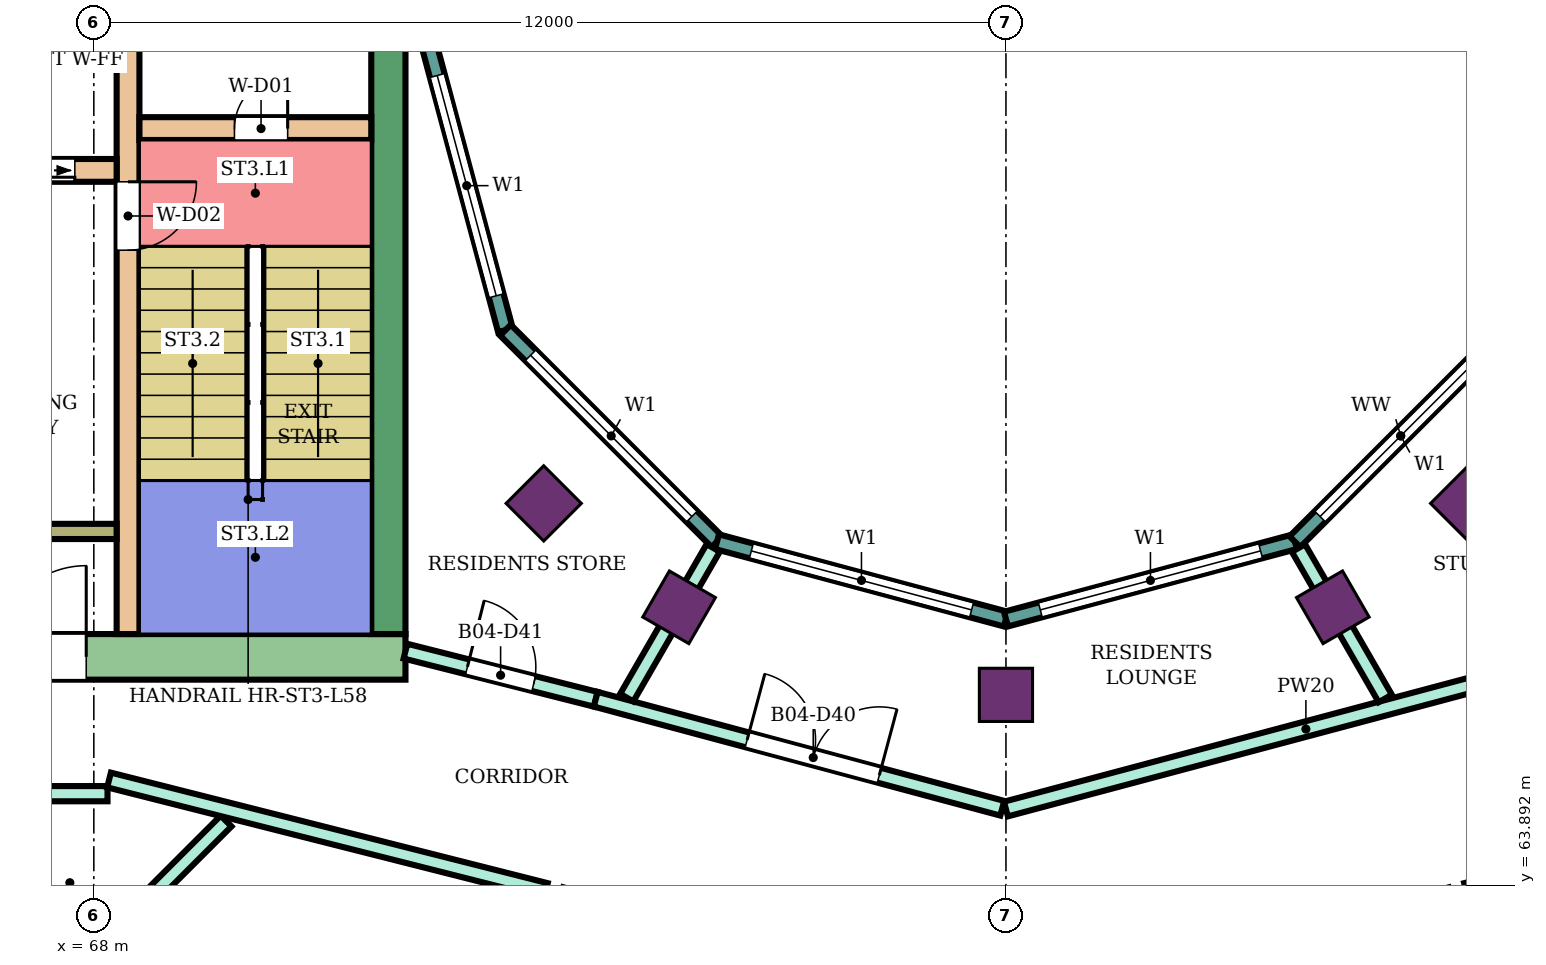
"""IFC4 building model, lengths in metres.
Left out: names, types, materials, properties, quantities, classifications, styles, units other than length and angle.
Written with IfcOpenShell. Run it as: python <this file> out.ifc"""

import sys

from ifc_helpers import new_model, si_unit, direction, frame, frame_2d, origin, origin_2d, place, context, subcontext, project, spatial, rectangle, extrude, element, fill, save


model = new_model("IFC4")
c1 = context("Model", 3, precision=1e-05, world=origin(), true_north=direction((0.0, 1.0)))
c2 = subcontext(c1, "Body", "Model", "MODEL_VIEW")
j1 = project(units=[si_unit("LENGTHUNIT", "METRE"), si_unit("PLANEANGLEUNIT", "RADIAN")], contexts=[c1])
p1 = place(None, origin())
s1 = spatial("IfcSite", under=j1, at=p1, CompositionType="ELEMENT")
p2 = place(p1, origin())
s2 = spatial("IfcBuilding", under=s1, at=p2, CompositionType="ELEMENT")
p3 = place(p2, frame((0.0, 0.0, 254.1)))
s3 = spatial("IfcBuildingStorey", under=s2, at=p3, CompositionType="ELEMENT", Elevation=254.1)
for number, where, z_axis, x_axis in (
    (1, (73.919, 68.919, 0.0), (0.0, 0.0, 1.0), (-0.707, -0.707, 0.0)),
    (2, (75.7, 67.552, 0.0), (0.0, 0.0, 1.0), (-0.5, -0.866, 0.0)),
    (3, (80.0, 66.4, 0.0), (0.0, 0.0, 1.0), (0.0, -1.0, 0.0)),
    (4, (84.3, 67.552, 0.0), (0.0, 0.0, 1.0), (0.5, -0.866, 0.0)),
    (5, (86.081, 68.919, 0.0), (0.0, 0.0, 1.0), (0.707, -0.707, 0.0)),
):
    element("IfcColumn", number, at=place(p3, frame(where, z_axis=z_axis, x_axis=x_axis)), inside=s3, PredefinedType="COLUMN", context=c2, shape_type="SweptSolid", body=[
        extrude(rectangle(XDim=0.7, YDim=0.7, at=origin_2d()), origin(), (0.0, 0.0, 1.0), 4.2),
    ])
p4 = place(p3, frame((72.1, 66.9, 0.0), z_axis=(0.0, 0.0, 1.0), x_axis=(-1.0, 0.0, 0.0)))
e6 = element("IfcWall", 6, at=p4, inside=s3, PredefinedType="SHEAR", context=c2, shape_type="SweptSolid", body=[
    extrude(rectangle(XDim=14.9, YDim=0.6, at=frame_2d((7.45, 0.0))), origin(), (0.0, 0.0, 1.0), 3.88),
])
p5 = place(p4, frame((4.2, 0.0, 0.0)))
e7 = element("IfcOpeningElement", 7, at=p5, cuts=e6, PredefinedType="OPENING", context=c2, shape_type="SweptSolid", body=[
    extrude(rectangle(XDim=2.4, YDim=2.4, at=frame_2d((1.2, 1.2))), frame((0.0, 0.31, 0.0), z_axis=(0.0, -1.0, 0.0), x_axis=(1.0, 0.0, 0.0)), (0.0, 0.0, 1.0), 0.62),
])
p6 = place(p3, frame((71.875, 75.0, 0.0), z_axis=(0.0, 0.0, 1.0), x_axis=(0.0, -1.0, 0.0)))
e8 = element("IfcWall", 8, at=p6, inside=s3, PredefinedType="SHEAR", context=c2, shape_type="SweptSolid", body=[
    extrude(rectangle(XDim=7.8, YDim=0.45, at=frame_2d((3.9, 0.0))), origin(), (0.0, 0.0, 1.0), 3.88),
])
p7 = place(p3, frame((68.45, 75.0, 0.0), z_axis=(0.0, 0.0, 1.0), x_axis=(0.0, -1.0, 0.0)))
e9 = element("IfcWall", 9, at=p7, inside=s3, PredefinedType="SHEAR", context=c2, shape_type="SweptSolid", body=[
    extrude(rectangle(XDim=7.8, YDim=0.3, at=frame_2d((3.9, 0.0))), origin(), (0.0, 0.0, 1.0), 3.88),
])
p8 = place(p7, frame((1.85, 0.0, 0.0)))
e10 = element("IfcOpeningElement", 10, at=p8, cuts=e9, PredefinedType="OPENING", context=c2, shape_type="SweptSolid", body=[
    extrude(rectangle(XDim=0.9, YDim=2.1, at=frame_2d((0.45, 1.05))), frame((0.0, 0.16, 0.0), z_axis=(0.0, -1.0, 0.0), x_axis=(1.0, 0.0, 0.0)), (0.0, 0.0, 1.0), 0.32),
])
p9 = place(p3, frame((71.65, 73.85, 0.0), z_axis=(0.0, 0.0, 1.0), x_axis=(-1.0, 0.0, 0.0)))
e11 = element("IfcWall", 11, at=p9, inside=s3, PredefinedType="SHEAR", context=c2, shape_type="SweptSolid", body=[
    extrude(rectangle(XDim=3.05, YDim=0.3, at=frame_2d((1.525, 0.0))), origin(), (0.0, 0.0, 1.0), 3.88),
])
p10 = place(p9, frame((1.1, 0.0, 0.0)))
e12 = element("IfcOpeningElement", 12, at=p10, cuts=e11, PredefinedType="OPENING", context=c2, shape_type="SweptSolid", body=[
    extrude(rectangle(XDim=0.7, YDim=2.0, at=frame_2d((0.35, 1.0))), frame((0.0, 0.16, 0.0), z_axis=(0.0, -1.0, 0.0), x_axis=(1.0, 0.0, 0.0)), (0.0, 0.0, 1.0), 0.32),
])
p11 = place(p3, frame((68.3, 73.3, 0.0), z_axis=(0.0, 0.0, 1.0), x_axis=(-1.0, 0.0, 0.0)))
e13 = element("IfcWall", 13, at=p11, inside=s3, PredefinedType="SHEAR", context=c2, shape_type="SweptSolid", body=[
    extrude(rectangle(XDim=11.1, YDim=0.3, at=frame_2d((5.55, 0.0))), origin(), (0.0, 0.0, 1.0), 3.88),
])
p12 = place(p11, frame((0.55, 0.0, 0.0)))
e14 = element("IfcOpeningElement", 14, at=p12, cuts=e13, PredefinedType="OPENING", context=c2, shape_type="SweptSolid", body=[
    extrude(rectangle(XDim=1.1, YDim=2.1, at=frame_2d((0.55, 1.05))), frame((0.0, 0.16, 0.0), z_axis=(0.0, -1.0, 0.0), x_axis=(1.0, 0.0, 0.0)), (0.0, 0.0, 1.0), 0.32),
])
p13 = place(p11, frame((3.0, 0.0, 0.0)))
e15 = element("IfcOpeningElement", 15, at=p13, cuts=e13, PredefinedType="OPENING", context=c2, shape_type="SweptSolid", body=[
    extrude(rectangle(XDim=1.2, YDim=2.1, at=frame_2d((0.6, 1.05))), frame((0.0, 0.16, 0.0), z_axis=(0.0, -1.0, 0.0), x_axis=(1.0, 0.0, 0.0)), (0.0, 0.0, 1.0), 0.32),
])
p14 = place(p11, frame((5.5, 0.0, 0.0)))
e16 = element("IfcOpeningElement", 16, at=p14, cuts=e13, PredefinedType="OPENING", context=c2, shape_type="SweptSolid", body=[
    extrude(rectangle(XDim=1.2, YDim=2.1, at=frame_2d((0.6, 1.05))), frame((0.0, 0.16, 0.0), z_axis=(0.0, -1.0, 0.0), x_axis=(1.0, 0.0, 0.0)), (0.0, 0.0, 1.0), 0.32),
])
p15 = place(p11, frame((7.77, 0.0, 0.0)))
e17 = element("IfcOpeningElement", 17, at=p15, cuts=e13, PredefinedType="OPENING", context=c2, shape_type="SweptSolid", body=[
    extrude(rectangle(XDim=0.9, YDim=2.1, at=frame_2d((0.45, 1.05))), frame((0.0, 0.16, 0.0), z_axis=(0.0, -1.0, 0.0), x_axis=(1.0, 0.0, 0.0)), (0.0, 0.0, 1.0), 0.32),
])
p16 = place(p11, frame((9.57, 0.0, 0.0)))
e18 = element("IfcOpeningElement", 18, at=p16, cuts=e13, PredefinedType="OPENING", context=c2, shape_type="SweptSolid", body=[
    extrude(rectangle(XDim=0.9, YDim=2.1, at=frame_2d((0.45, 1.05))), frame((0.0, 0.16, 0.0), z_axis=(0.0, -1.0, 0.0), x_axis=(1.0, 0.0, 0.0)), (0.0, 0.0, 1.0), 0.32),
])
p17 = place(p3, frame((68.3, 68.55, 0.0), z_axis=(0.0, 0.0, 1.0), x_axis=(-1.0, 0.0, 0.0)))
e19 = element("IfcWall", 19, at=p17, inside=s3, PredefinedType="SHEAR", context=c2, shape_type="SweptSolid", body=[
    extrude(rectangle(XDim=4.35, YDim=0.2, at=frame_2d((2.175, 0.0))), origin(), (0.0, 0.0, 1.0), 3.88),
])
p18 = place(p3, frame((72.396, 75.0, 0.0), z_axis=(0.0, 0.0, 1.0), x_axis=(0.258789828301, -0.965933654434, 0.0)))
e20 = element("IfcWall", 20, at=p18, inside=s3, PredefinedType="NOTDEFINED", context=c2, shape_type="SweptSolid", body=[
    extrude(rectangle(XDim=3.936, YDim=0.2, at=frame_2d((1.968, 0.0))), origin(), (0.0, 0.0, 1.0), 4.2),
])
p19 = place(p18, frame((0.468, 0.0, 0.9)))
e21 = element("IfcOpeningElement", 21, at=p19, cuts=e20, PredefinedType="OPENING", context=c2, shape_type="SweptSolid", body=[
    extrude(rectangle(XDim=3.0, YDim=2.3, at=frame_2d((1.5, 1.15))), frame((0.0, 0.11, 0.0), z_axis=(0.0, -1.0, 0.0), x_axis=(1.0, 0.0, 0.0)), (0.0, 0.0, 1.0), 0.22),
])
p20 = place(p3, frame((73.415, 71.198, 0.0), z_axis=(0.0, 0.0, 1.0), x_axis=(0.707106781187, -0.707106781187, 0.0)))
e22 = element("IfcWall", 22, at=p20, inside=s3, PredefinedType="NOTDEFINED", context=c2, shape_type="SweptSolid", body=[
    extrude(rectangle(XDim=3.936, YDim=0.2, at=frame_2d((1.968, 0.0))), origin(), (0.0, 0.0, 1.0), 4.2),
])
p21 = place(p20, frame((0.468, 0.0, 0.9)))
e23 = element("IfcOpeningElement", 23, at=p21, cuts=e22, PredefinedType="OPENING", context=c2, shape_type="SweptSolid", body=[
    extrude(rectangle(XDim=3.0, YDim=2.3, at=frame_2d((1.5, 1.15))), frame((0.0, 0.11, 0.0), z_axis=(0.0, -1.0, 0.0), x_axis=(1.0, 0.0, 0.0)), (0.0, 0.0, 1.0), 0.22),
])
p22 = place(p3, frame((76.198, 68.415, 0.0), z_axis=(0.0, 0.0, 1.0), x_axis=(0.965933654434, -0.258789828301, 0.0)))
e24 = element("IfcWall", 24, at=p22, inside=s3, PredefinedType="NOTDEFINED", context=c2, shape_type="SweptSolid", body=[
    extrude(rectangle(XDim=3.936, YDim=0.2, at=frame_2d((1.968, 0.0))), origin(), (0.0, 0.0, 1.0), 4.2),
])
p23 = place(p22, frame((0.468, 0.0, 0.9)))
e25 = element("IfcOpeningElement", 25, at=p23, cuts=e24, PredefinedType="OPENING", context=c2, shape_type="SweptSolid", body=[
    extrude(rectangle(XDim=3.0, YDim=2.3, at=frame_2d((1.5, 1.15))), frame((0.0, 0.11, 0.0), z_axis=(0.0, -1.0, 0.0), x_axis=(1.0, 0.0, 0.0)), (0.0, 0.0, 1.0), 0.22),
])
p24 = place(p3, frame((80.0, 67.396, 0.0), z_axis=(0.0, 0.0, 1.0), x_axis=(0.965933654434, 0.258789828301, 0.0)))
e26 = element("IfcWall", 26, at=p24, inside=s3, PredefinedType="NOTDEFINED", context=c2, shape_type="SweptSolid", body=[
    extrude(rectangle(XDim=3.936, YDim=0.2, at=frame_2d((1.968, 0.0))), origin(), (0.0, 0.0, 1.0), 4.2),
])
p25 = place(p24, frame((0.468, 0.0, 0.9)))
e27 = element("IfcOpeningElement", 27, at=p25, cuts=e26, PredefinedType="OPENING", context=c2, shape_type="SweptSolid", body=[
    extrude(rectangle(XDim=3.0, YDim=2.3, at=frame_2d((1.5, 1.15))), frame((0.0, 0.11, 0.0), z_axis=(0.0, -1.0, 0.0), x_axis=(1.0, 0.0, 0.0)), (0.0, 0.0, 1.0), 0.22),
])
p26 = place(p3, frame((83.802, 68.415, 0.0), z_axis=(0.0, 0.0, 1.0), x_axis=(0.707106781187, 0.707106781187, 0.0)))
e28 = element("IfcWall", 28, at=p26, inside=s3, PredefinedType="NOTDEFINED", context=c2, shape_type="SweptSolid", body=[
    extrude(rectangle(XDim=3.936, YDim=0.2, at=frame_2d((1.968, 0.0))), origin(), (0.0, 0.0, 1.0), 4.2),
])
p27 = place(p26, frame((0.468, 0.0, 0.9)))
e29 = element("IfcOpeningElement", 29, at=p27, cuts=e28, PredefinedType="OPENING", context=c2, shape_type="SweptSolid", body=[
    extrude(rectangle(XDim=3.0, YDim=2.3, at=frame_2d((1.5, 1.15))), frame((0.0, 0.11, 0.0), z_axis=(0.0, -1.0, 0.0), x_axis=(1.0, 0.0, 0.0)), (0.0, 0.0, 1.0), 0.22),
])
p28 = place(p3, frame((63.596, 58.596, 0.0), z_axis=(0.0, 0.0, 1.0), x_axis=(0.707106781187, 0.707106781187, 0.0)))
e30 = element("IfcWall", 30, at=p28, inside=s3, PredefinedType="PARTITIONING", context=c2, shape_type="SweptSolid", body=[
    extrude(rectangle(XDim=8.689, YDim=0.2, at=frame_2d((4.344, 0.0))), origin(), (0.0, 0.0, 1.0), 3.75),
])
p29 = place(p3, frame((65.2, 65.1, 0.0), z_axis=(0.0, 0.0, 1.0), x_axis=(1.0, 0.0, 0.0)))
e31 = element("IfcWall", 31, at=p29, inside=s3, PredefinedType="PARTITIONING", context=c2, shape_type="SweptSolid", body=[
    extrude(rectangle(XDim=2.98, YDim=0.2, at=frame_2d((1.49, 0.0))), origin(), (0.0, 0.0, 1.0), 3.75),
])
p30 = place(p29, frame((0.16, 0.0, 0.0)))
e32 = element("IfcOpeningElement", 32, at=p30, cuts=e31, PredefinedType="OPENING", context=c2, shape_type="SweptSolid", body=[
    extrude(rectangle(XDim=1.0, YDim=2.1, at=frame_2d((0.5, 1.05))), frame((0.0, 0.11, 0.0), z_axis=(0.0, -1.0, 0.0), x_axis=(1.0, 0.0, 0.0)), (0.0, 0.0, 1.0), 0.22),
])
p31 = place(p3, frame((68.2, 65.28, 0.0), z_axis=(0.0, 0.0, 1.0), x_axis=(0.969450596516, -0.245286650503, 0.0)))
e33 = element("IfcWall", 33, at=p31, inside=s3, PredefinedType="PARTITIONING", context=c2, shape_type="SweptSolid", body=[
    extrude(rectangle(XDim=5.928, YDim=0.2, at=frame_2d((2.964, 0.0))), origin(), (0.0, 0.0, 1.0), 3.75),
])
p32 = place(p3, frame((72.1, 66.975, 0.0), z_axis=(0.0, 0.0, 1.0), x_axis=(0.969471314457, -0.245204752086, 0.0)))
e34 = element("IfcWall", 34, at=p32, inside=s3, PredefinedType="PARTITIONING", context=c2, shape_type="SweptSolid", body=[
    extrude(rectangle(XDim=2.582, YDim=0.2, at=frame_2d((1.291, 0.0))), origin(), (0.0, 0.0, 1.0), 3.75),
])
p33 = place(p32, frame((0.841, 0.0, 0.0)))
e35 = element("IfcOpeningElement", 35, at=p33, cuts=e34, PredefinedType="OPENING", context=c2, shape_type="SweptSolid", body=[
    extrude(rectangle(XDim=0.9, YDim=2.1, at=frame_2d((0.45, 1.05))), frame((0.0, 0.11, 0.0), z_axis=(0.0, -1.0, 0.0), x_axis=(1.0, 0.0, 0.0)), (0.0, 0.0, 1.0), 0.22),
])
p34 = place(p3, frame((74.603, 66.342, 0.0), z_axis=(0.0, 0.0, 1.0), x_axis=(0.965895298152, -0.258932950796, 0.0)))
e36 = element("IfcWall", 36, at=p34, inside=s3, PredefinedType="PARTITIONING", context=c2, shape_type="SweptSolid", body=[
    extrude(rectangle(XDim=5.538, YDim=0.2, at=frame_2d((2.769, 0.0))), origin(), (0.0, 0.0, 1.0), 3.75),
])
p35 = place(p34, frame((2.062, 0.0, 0.0)))
e37 = element("IfcOpeningElement", 37, at=p35, cuts=e36, PredefinedType="OPENING", context=c2, shape_type="SweptSolid", body=[
    extrude(rectangle(XDim=1.8, YDim=2.1, at=frame_2d((0.9, 1.05))), frame((0.0, 0.11, 0.0), z_axis=(0.0, -1.0, 0.0), x_axis=(1.0, 0.0, 0.0)), (0.0, 0.0, 1.0), 0.22),
])
p36 = place(p3, frame((75.011, 66.364, 0.0), z_axis=(0.0, 0.0, 1.0), x_axis=(0.500121996664, 0.86595495752, 0.0)))
e38 = element("IfcWall", 38, at=p36, inside=s3, PredefinedType="PARTITIONING", context=c2, shape_type="SweptSolid", body=[
    extrude(rectangle(XDim=2.274, YDim=0.2, at=frame_2d((1.137, 0.0))), origin(), (0.0, 0.0, 1.0), 3.75),
])
p37 = place(p3, frame((80.0, 64.898, 0.0), z_axis=(0.0, 0.0, 1.0), x_axis=(0.966237419782, 0.257653349704, 0.0)))
e39 = element("IfcWall", 39, at=p37, inside=s3, PredefinedType="PARTITIONING", context=c2, shape_type="SweptSolid", body=[
    extrude(rectangle(XDim=8.169, YDim=0.2, at=frame_2d((4.084, 0.0))), origin(), (0.0, 0.0, 1.0), 3.75),
])
p38 = place(p37, frame((6.428, 0.0, 0.0)))
e40 = element("IfcOpeningElement", 40, at=p38, cuts=e39, PredefinedType="OPENING", context=c2, shape_type="SweptSolid", body=[
    extrude(rectangle(XDim=0.9, YDim=2.1, at=frame_2d((0.45, 1.05))), frame((0.0, 0.11, 0.0), z_axis=(0.0, -1.0, 0.0), x_axis=(1.0, 0.0, 0.0)), (0.0, 0.0, 1.0), 0.22),
])
p39 = place(p3, frame((83.848, 68.331, 0.0), z_axis=(0.0, 0.0, 1.0), x_axis=(0.499851978358, -0.866110847255, 0.0)))
e41 = element("IfcWall", 41, at=p39, inside=s3, PredefinedType="PARTITIONING", context=c2, shape_type="SweptSolid", body=[
    extrude(rectangle(XDim=2.284, YDim=0.2, at=frame_2d((1.142, 0.0))), origin(), (0.0, 0.0, 1.0), 3.75),
])
p40 = place(p3, frame((86.053, 63.826, 0.0), z_axis=(0.0, 0.0, 1.0), x_axis=(0.969490004987, 0.245130843083, 0.0)))
e42 = element("IfcWall", 42, at=p40, inside=s3, PredefinedType="PARTITIONING", context=c2, shape_type="SweptSolid", body=[
    extrude(rectangle(XDim=5.908, YDim=0.2, at=frame_2d((2.954, 0.0))), origin(), (0.0, 0.0, 1.0), 3.75),
])
p41 = place(p19, origin())
e43 = element("IfcWindow", 43, at=p41, inside=s3, PartitioningType="SINGLE_PANEL", PredefinedType="WINDOW", context=c2, shape_type="SweptSolid", body=[
    extrude(rectangle(XDim=3.0, YDim=2.3, at=frame_2d((1.5, 1.15))), frame((0.0, 0.03, 0.0), z_axis=(0.0, -1.0, 0.0), x_axis=(1.0, 0.0, 0.0)), (0.0, 0.0, 1.0), 0.06),
])
fill(e21, e43)
p42 = place(p21, origin())
e44 = element("IfcWindow", 44, at=p42, inside=s3, PartitioningType="SINGLE_PANEL", PredefinedType="WINDOW", context=c2, shape_type="SweptSolid", body=[
    extrude(rectangle(XDim=3.0, YDim=2.3, at=frame_2d((1.5, 1.15))), frame((0.0, 0.03, 0.0), z_axis=(0.0, -1.0, 0.0), x_axis=(1.0, 0.0, 0.0)), (0.0, 0.0, 1.0), 0.06),
])
fill(e23, e44)
p43 = place(p23, origin())
e45 = element("IfcWindow", 45, at=p43, inside=s3, PartitioningType="SINGLE_PANEL", PredefinedType="WINDOW", context=c2, shape_type="SweptSolid", body=[
    extrude(rectangle(XDim=3.0, YDim=2.3, at=frame_2d((1.5, 1.15))), frame((0.0, 0.03, 0.0), z_axis=(0.0, -1.0, 0.0), x_axis=(1.0, 0.0, 0.0)), (0.0, 0.0, 1.0), 0.06),
])
fill(e25, e45)
p44 = place(p25, origin())
e46 = element("IfcWindow", 46, at=p44, inside=s3, PartitioningType="SINGLE_PANEL", PredefinedType="WINDOW", context=c2, shape_type="SweptSolid", body=[
    extrude(rectangle(XDim=3.0, YDim=2.3, at=frame_2d((1.5, 1.15))), frame((0.0, 0.03, 0.0), z_axis=(0.0, -1.0, 0.0), x_axis=(1.0, 0.0, 0.0)), (0.0, 0.0, 1.0), 0.06),
])
fill(e27, e46)
p45 = place(p27, origin())
e47 = element("IfcWindow", 47, at=p45, inside=s3, PartitioningType="SINGLE_PANEL", PredefinedType="WINDOW", context=c2, shape_type="SweptSolid", body=[
    extrude(rectangle(XDim=3.0, YDim=2.3, at=frame_2d((1.5, 1.15))), frame((0.0, 0.03, 0.0), z_axis=(0.0, -1.0, 0.0), x_axis=(1.0, 0.0, 0.0)), (0.0, 0.0, 1.0), 0.06),
])
fill(e29, e47)
p46 = place(p35, origin())
e48 = element("IfcDoor", 48, at=p46, inside=s3, OperationType="DOUBLE_DOOR_SINGLE_SWING", PredefinedType="DOOR", context=c2, shape_type="SweptSolid", body=[
    extrude(rectangle(XDim=1.8, YDim=2.1, at=frame_2d((0.9, 1.05))), frame((0.0, 0.025, 0.0), z_axis=(0.0, -1.0, 0.0), x_axis=(1.0, 0.0, 0.0)), (0.0, 0.0, 1.0), 0.05),
])
fill(e37, e48)
p47 = place(p33, origin())
e49 = element("IfcDoor", 49, at=p47, inside=s3, OperationType="SINGLE_SWING_LEFT", PredefinedType="DOOR", context=c2, shape_type="SweptSolid", body=[
    extrude(rectangle(XDim=0.9, YDim=2.1, at=frame_2d((0.45, 1.05))), frame((0.0, 0.025, 0.0), z_axis=(0.0, -1.0, 0.0), x_axis=(1.0, 0.0, 0.0)), (0.0, 0.0, 1.0), 0.05),
])
fill(e35, e49)
p48 = place(p10, frame((0.7, 0.0, 0.0), z_axis=(0.0, 0.0, 1.0), x_axis=(-1.0, 0.0, 0.0)))
e50 = element("IfcDoor", 50, at=p48, inside=s3, OperationType="SINGLE_SWING_RIGHT", PredefinedType="DOOR", context=c2, shape_type="SweptSolid", body=[
    extrude(rectangle(XDim=0.7, YDim=2.0, at=frame_2d((0.35, 1.0))), frame((0.0, 0.025, 0.0), z_axis=(0.0, -1.0, 0.0), x_axis=(1.0, 0.0, 0.0)), (0.0, 0.0, 1.0), 0.05),
])
fill(e12, e50)
p49 = place(p8, origin())
e51 = element("IfcDoor", 51, at=p49, inside=s3, OperationType="SINGLE_SWING_LEFT", PredefinedType="DOOR", context=c2, shape_type="SweptSolid", body=[
    extrude(rectangle(XDim=0.9, YDim=2.1, at=frame_2d((0.45, 1.05))), frame((0.0, 0.025, 0.0), z_axis=(0.0, -1.0, 0.0), x_axis=(1.0, 0.0, 0.0)), (0.0, 0.0, 1.0), 0.05),
])
fill(e10, e51)
p50 = place(p12, origin())
e52 = element("IfcDoor", 52, at=p50, inside=s3, OperationType="DOUBLE_DOOR_SLIDING", PredefinedType="DOOR", context=c2, shape_type="SweptSolid", body=[
    extrude(rectangle(XDim=1.1, YDim=2.1, at=frame_2d((0.55, 1.05))), frame((0.0, 0.025, 0.0), z_axis=(0.0, -1.0, 0.0), x_axis=(1.0, 0.0, 0.0)), (0.0, 0.0, 1.0), 0.05),
])
fill(e14, e52)
p51 = place(p5, frame((2.4, 0.0, 0.0), z_axis=(0.0, 0.0, 1.0), x_axis=(-1.0, 0.0, 0.0)))
e53 = element("IfcDoor", 53, at=p51, inside=s3, OperationType="DOUBLE_DOOR_SINGLE_SWING", PredefinedType="DOOR", context=c2, shape_type="SweptSolid", body=[
    extrude(rectangle(XDim=2.4, YDim=2.4, at=frame_2d((1.2, 1.2))), frame((0.0, 0.025, 0.0), z_axis=(0.0, -1.0, 0.0), x_axis=(1.0, 0.0, 0.0)), (0.0, 0.0, 1.0), 0.05),
])
fill(e7, e53)
save(model, sys.argv[1])
